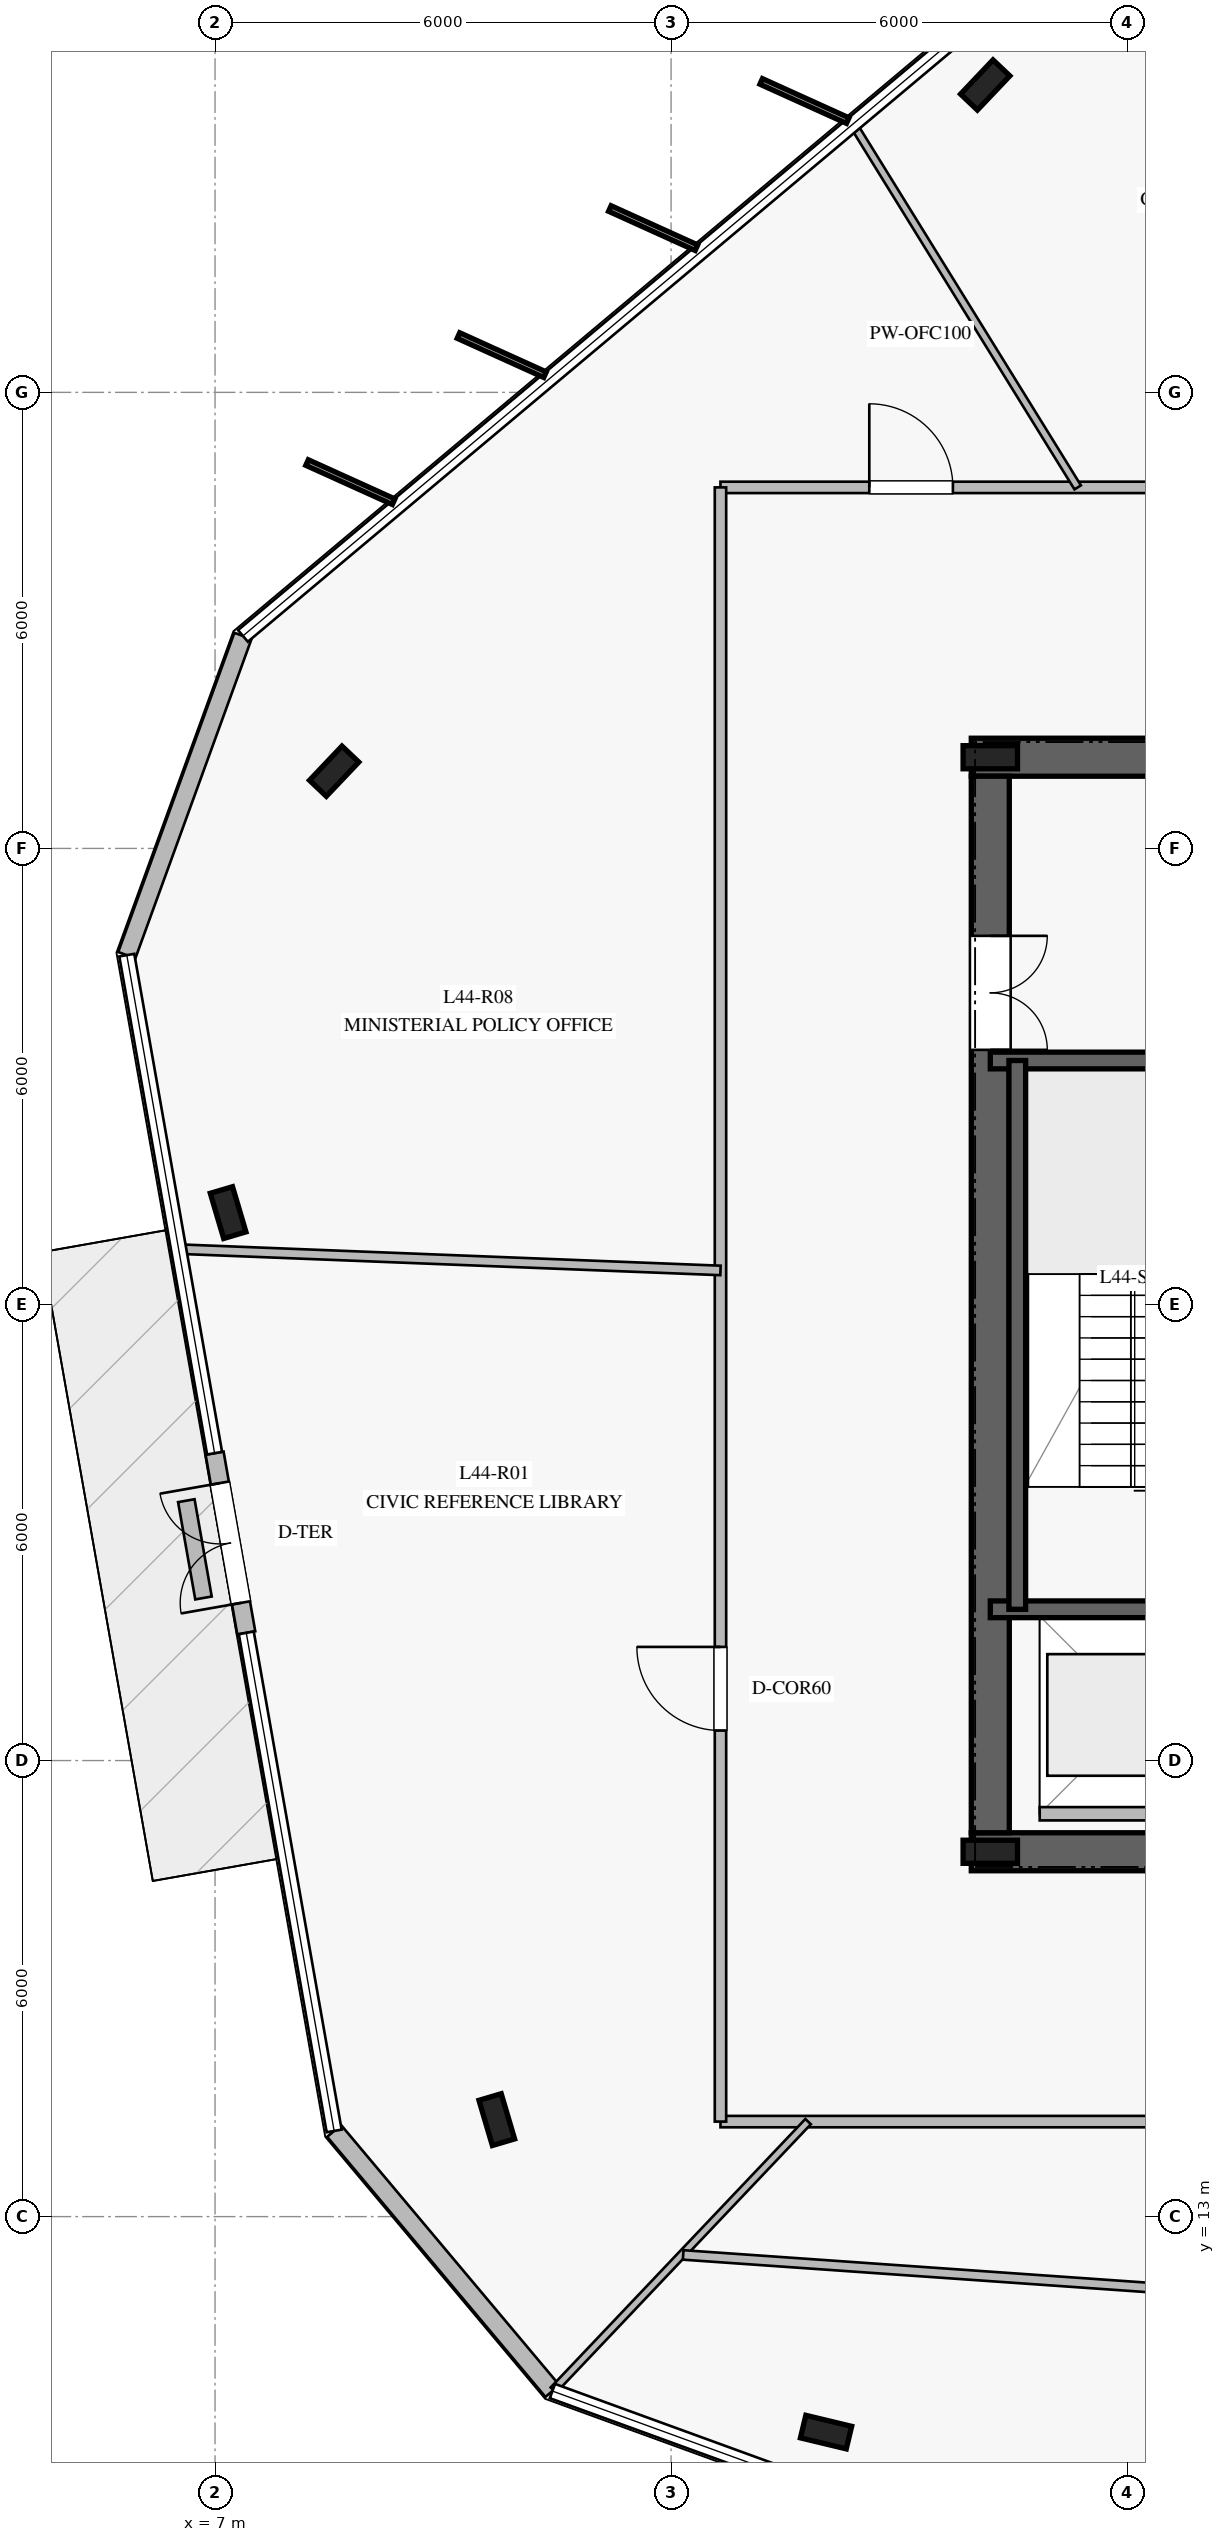
"""IFC4 building model, lengths in metres.
Left out: names, types, materials, properties, quantities, classifications, styles, units other than length and angle.
Written with IfcOpenShell. Run it as: python <this file> out.ifc"""

import sys

from ifc_helpers import new_model, si_unit, direction, frame, frame_2d, origin, origin_2d, place, context, subcontext, project, spatial, rectangle, i_section, extrude, element, fill, save


model = new_model("IFC4")
c1 = context("Model", 3, precision=1e-05, world=origin(), true_north=direction((0.0, 1.0)))
c2 = subcontext(c1, "Body", "Model", "MODEL_VIEW")
j1 = project(units=[si_unit("LENGTHUNIT", "METRE"), si_unit("PLANEANGLEUNIT", "RADIAN")], contexts=[c1])
p1 = place(None, origin())
s1 = spatial("IfcSite", under=j1, at=p1, CompositionType="ELEMENT")
p2 = place(p1, origin())
s2 = spatial("IfcBuilding", under=s1, at=p2, CompositionType="ELEMENT")
p3 = place(p2, frame((0.0, 0.0, 184.8)))
s3 = spatial("IfcBuildingStorey", under=s2, at=p3, CompositionType="ELEMENT", Elevation=184.8)
p4 = place(p3, frame((16.95, 17.8, 0.0), z_axis=(0.0, 0.0, 1.0), x_axis=(1.0, 0.0, 0.0)))
e1 = element("IfcWall", 1, at=p4, inside=s3, PredefinedType="SHEAR", context=c2, shape_type="SweptSolid", body=[
    extrude(rectangle(XDim=16.1, YDim=0.5, at=frame_2d((8.05, 0.0))), origin(), (0.0, 0.0, 1.0), 3.78),
])
p5 = place(p4, frame((5.0, 0.0, 0.0)))
e2 = element("IfcOpeningElement", 2, at=p5, cuts=e1, PredefinedType="OPENING", context=c2, shape_type="SweptSolid", body=[
    extrude(rectangle(XDim=1.2, YDim=2.25, at=frame_2d((0.6, 1.125))), frame((0.0, 0.26, 0.0), z_axis=(0.0, -1.0, 0.0), x_axis=(1.0, 0.0, 0.0)), (0.0, 0.0, 1.0), 0.52),
])
p6 = place(p4, frame((10.9, 0.0, 0.0)))
e3 = element("IfcOpeningElement", 3, at=p6, cuts=e1, PredefinedType="OPENING", context=c2, shape_type="SweptSolid", body=[
    extrude(rectangle(XDim=1.1, YDim=2.2, at=frame_2d((0.55, 1.1))), frame((0.0, 0.26, 0.0), z_axis=(0.0, -1.0, 0.0), x_axis=(1.0, 0.0, 0.0)), (0.0, 0.0, 1.0), 0.52),
])
p7 = place(p3, frame((33.05, 32.2, 0.0), z_axis=(0.0, 0.0, 1.0), x_axis=(-1.0, 0.0, 0.0)))
e4 = element("IfcWall", 4, at=p7, inside=s3, PredefinedType="SHEAR", context=c2, shape_type="SweptSolid", body=[
    extrude(rectangle(XDim=16.1, YDim=0.5, at=frame_2d((8.05, 0.0))), origin(), (0.0, 0.0, 1.0), 3.78),
])
p8 = place(p7, frame((5.0, 0.0, 0.0)))
e5 = element("IfcOpeningElement", 5, at=p8, cuts=e4, PredefinedType="OPENING", context=c2, shape_type="SweptSolid", body=[
    extrude(rectangle(XDim=1.2, YDim=2.25, at=frame_2d((0.6, 1.125))), frame((0.0, 0.26, 0.0), z_axis=(0.0, -1.0, 0.0), x_axis=(1.0, 0.0, 0.0)), (0.0, 0.0, 1.0), 0.52),
])
p9 = place(p7, frame((9.825, 0.0, 0.0)))
e6 = element("IfcOpeningElement", 6, at=p9, cuts=e4, PredefinedType="OPENING", context=c2, shape_type="SweptSolid", body=[
    extrude(rectangle(XDim=1.1, YDim=2.2, at=frame_2d((0.55, 1.1))), frame((0.0, 0.26, 0.0), z_axis=(0.0, -1.0, 0.0), x_axis=(1.0, 0.0, 0.0)), (0.0, 0.0, 1.0), 0.52),
])
p10 = place(p3, frame((17.2, 31.95, 0.0), z_axis=(0.0, 0.0, 1.0), x_axis=(0.0, -1.0, 0.0)))
e7 = element("IfcWall", 7, at=p10, inside=s3, PredefinedType="SHEAR", context=c2, shape_type="SweptSolid", body=[
    extrude(rectangle(XDim=13.9, YDim=0.5, at=frame_2d((6.95, 0.0))), origin(), (0.0, 0.0, 1.0), 3.78),
])
p11 = place(p10, frame((2.1, 0.0, 0.0)))
e8 = element("IfcOpeningElement", 8, at=p11, cuts=e7, PredefinedType="OPENING", context=c2, shape_type="SweptSolid", body=[
    extrude(rectangle(XDim=1.5, YDim=2.2, at=frame_2d((0.75, 1.1))), frame((0.0, 0.26, 0.0), z_axis=(0.0, -1.0, 0.0), x_axis=(1.0, 0.0, 0.0)), (0.0, 0.0, 1.0), 0.52),
])
for number, where, z_axis, x_axis in (
    (9, (17.2, 17.8, 0.0), (0.0, 0.0, 1.0), (1.0, 0.0, 0.0)),
    (10, (17.2, 32.2, 0.0), (0.0, 0.0, 1.0), (1.0, 0.0, 0.0)),
):
    element("IfcColumn", number, at=place(p3, frame(where, z_axis=z_axis, x_axis=x_axis)), inside=s3, PredefinedType="COLUMN", context=c2, shape_type="SweptSolid", body=[
        extrude(i_section(OverallWidth=0.304, OverallDepth=0.716, WebThickness=0.021, FlangeThickness=0.04, at=origin_2d()), origin(), (0.0, 0.0, 1.0), 4.0),
    ])
for number, where, z_axis, x_axis in (
    (11, (17.2, 20.99, 0.0), (0.0, 0.0, 1.0), (1.0, 0.0, 0.0)),
    (12, (17.2, 28.21, 0.0), (0.0, 0.0, 1.0), (1.0, 0.0, 0.0)),
):
    element("IfcWall", number, at=place(p3, frame(where, z_axis=z_axis, x_axis=x_axis)), inside=s3, PredefinedType="SOLIDWALL", context=c2, shape_type="SweptSolid", body=[
        extrude(rectangle(XDim=3.72, YDim=0.22, at=frame_2d((1.86, 0.0))), origin(), (0.0, 0.0, 1.0), 3.78),
    ])
p12 = place(p3, frame((17.555, 28.21, 0.0), z_axis=(0.0, 0.0, 1.0), x_axis=(0.0, -1.0, 0.0)))
e13 = element("IfcWall", 13, at=p12, inside=s3, PredefinedType="SOLIDWALL", context=c2, shape_type="SweptSolid", body=[
    extrude(rectangle(XDim=7.22, YDim=0.22, at=frame_2d((3.61, 0.0))), origin(), (0.0, 0.0, 1.0), 3.78),
])
for number, where, z_axis, x_axis in (
    (14, (17.133, 41.044, 0.0), (0.0, 0.0, 1.0), (0.688, 0.725, 0.0)),
    (15, (8.567, 32.016, 0.0), (0.0, 0.0, 1.0), (0.688, 0.725, 0.0)),
    (16, (7.172, 26.209, 0.0), (0.0, 0.0, 1.0), (-0.284, 0.959, 0.0)),
    (17, (10.707, 14.276, 0.0), (0.0, 0.0, 1.0), (-0.284, 0.959, 0.0)),
    (18, (15.039, 10.165, 0.0), (0.0, 0.0, 1.0), (-0.972, 0.233, 0.0)),
):
    element("IfcColumn", number, at=place(p3, frame(where, z_axis=z_axis, x_axis=x_axis)), inside=s3, PredefinedType="COLUMN", context=c2, shape_type="SweptSolid", body=[
        extrude(i_section(OverallWidth=0.305, OverallDepth=0.62, WebThickness=0.021, FlangeThickness=0.04, at=origin_2d()), origin(), (0.0, 0.0, 1.0), 4.0),
    ])
p13 = place(p3, frame((7.367, 33.796, 0.0), z_axis=(0.0, 0.0, 1.0), x_axis=(-0.341857099862, -0.939751947736, 0.0)))
e19 = element("IfcWall", 19, at=p13, inside=s3, PredefinedType="STANDARD", context=c2, shape_type="SweptSolid", body=[
    extrude(rectangle(XDim=4.469, YDim=0.24, at=frame_2d((2.235, 0.0))), origin(), (0.0, 0.0, 1.0), 3.78),
])
p14 = place(p3, frame((6.994, 23.044, 0.0), z_axis=(0.0, 0.0, 1.0), x_axis=(0.173709908848, -0.984796866145, 0.0)))
e20 = element("IfcWall", 20, at=p14, inside=s3, PredefinedType="STANDARD", context=c2, shape_type="SweptSolid", body=[
    extrude(rectangle(XDim=2.4, YDim=0.24, at=frame_2d((1.2, 0.0))), origin(), (0.0, 0.0, 1.0), 3.78),
])
p15 = place(p14, frame((0.4, 0.0, 0.0)))
e21 = element("IfcOpeningElement", 21, at=p15, cuts=e20, PredefinedType="OPENING", context=c2, shape_type="SweptSolid", body=[
    extrude(rectangle(XDim=1.6, YDim=2.25, at=frame_2d((0.8, 1.125))), frame((0.0, 0.13, 0.0), z_axis=(0.0, -1.0, 0.0), x_axis=(1.0, 0.0, 0.0)), (0.0, 0.0, 1.0), 0.26),
])
p16 = place(p3, frame((8.567, 14.127, 0.0), z_axis=(0.0, 0.0, 1.0), x_axis=(0.642889570515, -0.765958876261, 0.0)))
e22 = element("IfcWall", 22, at=p16, inside=s3, PredefinedType="STANDARD", context=c2, shape_type="SweptSolid", body=[
    extrude(rectangle(XDim=4.468, YDim=0.24, at=frame_2d((2.234, 0.0))), origin(), (0.0, 0.0, 1.0), 3.78),
])
p17 = place(p3, frame((6.622, 22.419, 0.0), z_axis=(0.0, 0.0, 1.0), x_axis=(0.173742473276, -0.984791121497, 0.0)))
e23 = element("IfcWall", 23, at=p17, inside=s3, PredefinedType="USERDEFINED", context=c2, shape_type="SweptSolid", body=[
    extrude(rectangle(XDim=1.3, YDim=0.22, at=frame_2d((0.65, 0.0))), origin(), (0.0, 0.0, 1.0), 0.4),
])
p18 = place(p3, frame((17.85, 18.3, 0.0), z_axis=(0.0, 0.0, 1.0), x_axis=(1.0, 0.0, 0.0)))
e24 = element("IfcWall", 24, at=p18, inside=s3, PredefinedType="PARTITIONING", context=c2, shape_type="SweptSolid", body=[
    extrude(rectangle(XDim=2.6, YDim=0.175, at=frame_2d((1.3, 0.0))), origin(), (0.0, 0.0, 1.0), 3.78),
])
p19 = place(p3, frame((13.65, 35.75, 0.0), z_axis=(0.0, 0.0, 1.0), x_axis=(1.0, 0.0, 0.0)))
e25 = element("IfcWall", 25, at=p19, inside=s3, PredefinedType="PARTITIONING", context=c2, shape_type="SweptSolid", body=[
    extrude(rectangle(XDim=22.7, YDim=0.15, at=frame_2d((11.35, 0.0))), origin(), (0.0, 0.0, 1.0), 3.05),
])
p20 = place(p19, frame((17.327, 0.0, 0.0)))
e26 = element("IfcOpeningElement", 26, at=p20, cuts=e25, PredefinedType="OPENING", context=c2, shape_type="SweptSolid", body=[
    extrude(rectangle(XDim=1.1, YDim=2.2, at=frame_2d((0.55, 1.1))), frame((0.0, 0.085, 0.0), z_axis=(0.0, -1.0, 0.0), x_axis=(1.0, 0.0, 0.0)), (0.0, 0.0, 1.0), 0.17),
])
p21 = place(p19, frame((8.575, 0.0, 0.0)))
e27 = element("IfcOpeningElement", 27, at=p21, cuts=e25, PredefinedType="OPENING", context=c2, shape_type="SweptSolid", body=[
    extrude(rectangle(XDim=1.1, YDim=2.2, at=frame_2d((0.55, 1.1))), frame((0.0, 0.085, 0.0), z_axis=(0.0, -1.0, 0.0), x_axis=(1.0, 0.0, 0.0)), (0.0, 0.0, 1.0), 0.17),
])
p22 = place(p19, frame((1.958, 0.0, 0.0)))
e28 = element("IfcOpeningElement", 28, at=p22, cuts=e25, PredefinedType="OPENING", context=c2, shape_type="SweptSolid", body=[
    extrude(rectangle(XDim=1.1, YDim=2.2, at=frame_2d((0.55, 1.1))), frame((0.0, 0.085, 0.0), z_axis=(0.0, -1.0, 0.0), x_axis=(1.0, 0.0, 0.0)), (0.0, 0.0, 1.0), 0.17),
])
p23 = place(p3, frame((36.35, 14.25, 0.0), z_axis=(0.0, 0.0, 1.0), x_axis=(-1.0, 0.0, 0.0)))
e29 = element("IfcWall", 29, at=p23, inside=s3, PredefinedType="PARTITIONING", context=c2, shape_type="SweptSolid", body=[
    extrude(rectangle(XDim=22.7, YDim=0.15, at=frame_2d((11.35, 0.0))), origin(), (0.0, 0.0, 1.0), 3.05),
])
p24 = place(p23, frame((14.341, 0.0, 0.0)))
e30 = element("IfcOpeningElement", 30, at=p24, cuts=e29, PredefinedType="OPENING", context=c2, shape_type="SweptSolid", body=[
    extrude(rectangle(XDim=1.1, YDim=2.2, at=frame_2d((0.55, 1.1))), frame((0.0, 0.085, 0.0), z_axis=(0.0, -1.0, 0.0), x_axis=(1.0, 0.0, 0.0)), (0.0, 0.0, 1.0), 0.17),
])
p25 = place(p3, frame((13.65, 14.25, 0.0), z_axis=(0.0, 0.0, 1.0), x_axis=(0.0, 1.0, 0.0)))
e31 = element("IfcWall", 31, at=p25, inside=s3, PredefinedType="PARTITIONING", context=c2, shape_type="SweptSolid", body=[
    extrude(rectangle(XDim=21.5, YDim=0.15, at=frame_2d((10.75, 0.0))), origin(), (0.0, 0.0, 1.0), 3.05),
])
p26 = place(p25, frame((5.145, 0.0, 0.0)))
e32 = element("IfcOpeningElement", 32, at=p26, cuts=e31, PredefinedType="OPENING", context=c2, shape_type="SweptSolid", body=[
    extrude(rectangle(XDim=1.1, YDim=2.2, at=frame_2d((0.55, 1.1))), frame((0.0, 0.085, 0.0), z_axis=(0.0, -1.0, 0.0), x_axis=(1.0, 0.0, 0.0)), (0.0, 0.0, 1.0), 0.17),
])
p27 = place(p3, frame((18.35, 35.75, 0.0), z_axis=(0.0, 0.0, 1.0), x_axis=(-0.526135592747, 0.850400692641, 0.0)))
e33 = element("IfcWall", 33, at=p27, inside=s3, PredefinedType="MOVABLE", context=c2, shape_type="SweptSolid", body=[
    extrude(rectangle(XDim=5.603, YDim=0.1, at=frame_2d((2.802, 0.0))), origin(), (0.0, 0.0, 1.0), 3.18),
])
p28 = place(p3, frame((13.65, 25.448, 0.0), z_axis=(0.0, 0.0, 1.0), x_axis=(-0.999225696488, 0.039344726189, 0.0)))
e34 = element("IfcWall", 34, at=p28, inside=s3, PredefinedType="PARTITIONING", context=c2, shape_type="SweptSolid", body=[
    extrude(rectangle(XDim=7.117, YDim=0.125, at=frame_2d((3.559, 0.0))), origin(), (0.0, 0.0, 1.0), 3.18),
])
p29 = place(p3, frame((14.803, 14.25, 0.0), z_axis=(0.0, 0.0, 1.0), x_axis=(-0.688284115744, -0.725441228505, 0.0)))
e35 = element("IfcWall", 35, at=p29, inside=s3, PredefinedType="MOVABLE", context=c2, shape_type="SweptSolid", body=[
    extrude(rectangle(XDim=4.869, YDim=0.1, at=frame_2d((2.434, 0.0))), origin(), (0.0, 0.0, 1.0), 3.18),
])
p30 = place(p3, frame((13.159, 12.496, 0.0), z_axis=(0.0, 0.0, 1.0), x_axis=(0.99755970511, -0.069818584499, 0.0)))
e36 = element("IfcWall", 36, at=p30, inside=s3, PredefinedType="PARTITIONING", context=c2, shape_type="SweptSolid", body=[
    extrude(rectangle(XDim=15.9, YDim=0.125, at=frame_2d((7.95, 0.0))), origin(), (0.0, 0.0, 1.0), 3.28),
])
p31 = place(p30, frame((7.36, 0.0, 0.0)))
e37 = element("IfcOpeningElement", 37, at=p31, cuts=e36, PredefinedType="OPENING", context=c2, shape_type="SweptSolid", body=[
    extrude(rectangle(XDim=1.0, YDim=2.15, at=frame_2d((0.5, 1.075))), frame((0.0, 0.073, 0.0), z_axis=(0.0, -1.0, 0.0), x_axis=(1.0, 0.0, 0.0)), (0.0, 0.0, 1.0), 0.145),
])
p32 = place(p15, frame((1.6, 0.0, 0.0), z_axis=(0.0, 0.0, 1.0), x_axis=(-1.0, 0.0, 0.0)))
e38 = element("IfcDoor", 38, at=p32, inside=s3, OperationType="DOUBLE_DOOR_SINGLE_SWING", PredefinedType="DOOR", context=c2, shape_type="SweptSolid", body=[
    extrude(rectangle(XDim=1.6, YDim=2.25, at=frame_2d((0.8, 1.125))), frame((0.0, 0.025, 0.0), z_axis=(0.0, -1.0, 0.0), x_axis=(1.0, 0.0, 0.0)), (0.0, 0.0, 1.0), 0.05),
])
fill(e21, e38)
p33 = place(p11, origin())
e39 = element("IfcDoor", 39, at=p33, inside=s3, OperationType="DOUBLE_DOOR_SINGLE_SWING", PredefinedType="DOOR", context=c2, shape_type="SweptSolid", body=[
    extrude(rectangle(XDim=1.5, YDim=2.2, at=frame_2d((0.75, 1.1))), frame((0.0, 0.025, 0.0), z_axis=(0.0, -1.0, 0.0), x_axis=(1.0, 0.0, 0.0)), (0.0, 0.0, 1.0), 0.05),
])
fill(e8, e39)
p34 = place(p26, origin())
e40 = element("IfcDoor", 40, at=p34, inside=s3, OperationType="SINGLE_SWING_RIGHT", PredefinedType="DOOR", context=c2, shape_type="SweptSolid", body=[
    extrude(rectangle(XDim=1.1, YDim=2.2, at=frame_2d((0.55, 1.1))), frame((0.0, 0.025, 0.0), z_axis=(0.0, -1.0, 0.0), x_axis=(1.0, 0.0, 0.0)), (0.0, 0.0, 1.0), 0.05),
])
fill(e32, e40)
p35 = place(p22, origin())
e41 = element("IfcDoor", 41, at=p35, inside=s3, OperationType="SINGLE_SWING_LEFT", PredefinedType="DOOR", context=c2, shape_type="SweptSolid", body=[
    extrude(rectangle(XDim=1.1, YDim=2.2, at=frame_2d((0.55, 1.1))), frame((0.0, 0.025, 0.0), z_axis=(0.0, -1.0, 0.0), x_axis=(1.0, 0.0, 0.0)), (0.0, 0.0, 1.0), 0.05),
])
fill(e28, e41)
save(model, sys.argv[1])
